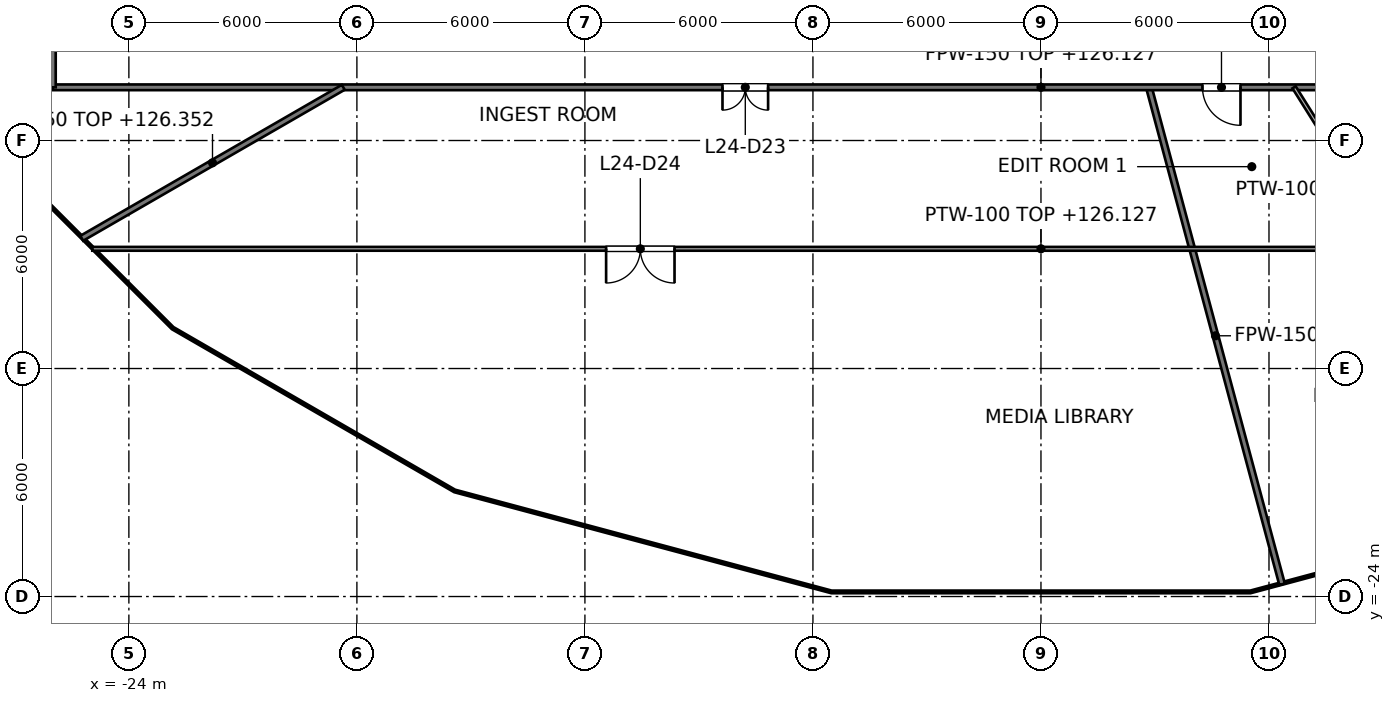
"""IFC4 building model, lengths in metres.
Left out: names, types, materials, properties, quantities, classifications, styles, units other than length and angle.
Written with IfcOpenShell. Run it as: python <this file> out.ifc"""

import sys

from ifc_helpers import new_model, si_unit, direction, frame, frame_2d, origin, place, context, subcontext, project, spatial, rectangle, extrude, element, fill, save


model = new_model("IFC4")
c1 = context("Model", 3, precision=1e-05, world=origin(), true_north=direction((0.0, 1.0)))
c2 = subcontext(c1, "Body", "Model", "MODEL_VIEW")
j1 = project(units=[si_unit("LENGTHUNIT", "METRE"), si_unit("PLANEANGLEUNIT", "RADIAN")], contexts=[c1])
p1 = place(None, origin())
s1 = spatial("IfcSite", under=j1, at=p1, CompositionType="ELEMENT")
p2 = place(p1, origin())
s2 = spatial("IfcBuilding", under=s1, at=p2, CompositionType="ELEMENT")
p3 = place(p2, frame((0.0, 0.0, 123.0)))
s3 = spatial("IfcBuildingStorey", under=s2, at=p3, CompositionType="ELEMENT", Elevation=123.0)
p4 = place(p3, frame((2.84, -10.6, 0.0), z_axis=(0.0, 0.0, 1.0), x_axis=(0.258833134742, -0.965922050872, 0.0)))
e1 = element("IfcWall", 1, at=p4, inside=s3, PredefinedType="PARTITIONING", context=c2, shape_type="SweptSolid", body=[
    extrude(rectangle(XDim=13.538, YDim=0.15, at=frame_2d((6.769, 0.0))), origin(), (0.0, 0.0, 1.0), 3.502),
])
p5 = place(p3, frame((-26.0, -10.6, 0.0), z_axis=(0.0, 0.0, 1.0), x_axis=(1.0, 0.0, 0.0)))
e2 = element("IfcWall", 2, at=p5, inside=s3, PredefinedType="PARTITIONING", context=c2, shape_type="SweptSolid", body=[
    extrude(rectangle(XDim=52.0, YDim=0.15, at=frame_2d((26.0, 0.0))), origin(), (0.0, 0.0, 1.0), 3.127),
])
p6 = place(p5, frame((17.62, 0.0, 0.0)))
e3 = element("IfcOpeningElement", 3, at=p6, cuts=e2, PredefinedType="OPENING", context=c2, shape_type="SweptSolid", body=[
    extrude(rectangle(XDim=1.2, YDim=2.1, at=frame_2d((0.6, 1.05))), frame((0.0, 0.075, 0.0), z_axis=(0.0, -1.0, 0.0), x_axis=(1.0, 0.0, 0.0)), (0.0, 0.0, 1.0), 0.15),
])
p7 = place(p5, frame((30.25, 0.0, 0.0)))
e4 = element("IfcOpeningElement", 4, at=p7, cuts=e2, PredefinedType="OPENING", context=c2, shape_type="SweptSolid", body=[
    extrude(rectangle(XDim=1.0, YDim=2.1, at=frame_2d((0.5, 1.05))), frame((0.0, 0.075, 0.0), z_axis=(0.0, -1.0, 0.0), x_axis=(1.0, 0.0, 0.0)), (0.0, 0.0, 1.0), 0.15),
])
p8 = place(p5, frame((34.989, 0.0, 0.0)))
e5 = element("IfcOpeningElement", 5, at=p8, cuts=e2, PredefinedType="OPENING", context=c2, shape_type="SweptSolid", body=[
    extrude(rectangle(XDim=1.0, YDim=2.1, at=frame_2d((0.5, 1.05))), frame((0.0, 0.075, 0.0), z_axis=(0.0, -1.0, 0.0), x_axis=(1.0, 0.0, 0.0)), (0.0, 0.0, 1.0), 0.15),
])
p9 = place(p5, frame((44.658, 0.0, 0.0)))
e6 = element("IfcOpeningElement", 6, at=p9, cuts=e2, PredefinedType="OPENING", context=c2, shape_type="SweptSolid", body=[
    extrude(rectangle(XDim=1.0, YDim=2.1, at=frame_2d((0.5, 1.05))), frame((0.0, 0.075, 0.0), z_axis=(0.0, -1.0, 0.0), x_axis=(1.0, 0.0, 0.0)), (0.0, 0.0, 1.0), 0.15),
])
p10 = place(p3, frame((-25.24, -14.573, 0.0), z_axis=(0.0, 0.0, 1.0), x_axis=(0.866020312459, 0.500008818331, 0.0)))
e7 = element("IfcWall", 7, at=p10, inside=s3, PredefinedType="PARTITIONING", context=c2, shape_type="SweptSolid", body=[
    extrude(rectangle(XDim=7.946, YDim=0.15, at=frame_2d((3.973, 0.0))), origin(), (0.0, 0.0, 1.0), 3.352),
])
p11 = place(p3, frame((-26.0, -10.6, 0.0), z_axis=(0.0, 0.0, 1.0), x_axis=(0.0, 1.0, 0.0)))
e8 = element("IfcWall", 8, at=p11, inside=s3, PredefinedType="PARTITIONING", context=c2, shape_type="SweptSolid", body=[
    extrude(rectangle(XDim=2.8, YDim=0.15, at=frame_2d((1.4, 0.0))), origin(), (0.0, 0.0, 1.0), 3.276),
])
p12 = place(p3, frame((6.66, -10.6, 0.0), z_axis=(0.0, 0.0, 1.0), x_axis=(0.532130705972, -0.846662218221, 0.0)))
e9 = element("IfcWall", 9, at=p12, inside=s3, PredefinedType="PARTITIONING", context=c2, shape_type="SweptSolid", body=[
    extrude(rectangle(XDim=5.02, YDim=0.1, at=frame_2d((2.51, 0.0))), origin(), (0.0, 0.0, 1.0), 4.05),
])
p13 = place(p3, frame((-24.963, -14.85, 0.0), z_axis=(0.0, 0.0, 1.0), x_axis=(1.0, 0.0, 0.0)))
e10 = element("IfcWall", 10, at=p13, inside=s3, PredefinedType="PARTITIONING", context=c2, shape_type="SweptSolid", body=[
    extrude(rectangle(XDim=49.926, YDim=0.1, at=frame_2d((24.963, 0.0))), origin(), (0.0, 0.0, 1.0), 3.127),
])
p14 = place(p13, frame((13.521, 0.0, 0.0)))
e11 = element("IfcOpeningElement", 11, at=p14, cuts=e10, PredefinedType="OPENING", context=c2, shape_type="SweptSolid", body=[
    extrude(rectangle(XDim=1.8, YDim=2.1, at=frame_2d((0.9, 1.05))), frame((0.0, 0.05, 0.0), z_axis=(0.0, -1.0, 0.0), x_axis=(1.0, 0.0, 0.0)), (0.0, 0.0, 1.0), 0.1),
])
p15 = place(p13, frame((43.92, 0.0, 0.0)))
e12 = element("IfcOpeningElement", 12, at=p15, cuts=e10, PredefinedType="OPENING", context=c2, shape_type="SweptSolid", body=[
    extrude(rectangle(XDim=0.9, YDim=2.1, at=frame_2d((0.45, 1.05))), frame((0.0, 0.05, 0.0), z_axis=(0.0, -1.0, 0.0), x_axis=(1.0, 0.0, 0.0)), (0.0, 0.0, 1.0), 0.1),
])
p16 = place(p6, origin())
e13 = element("IfcDoor", 13, at=p16, inside=s3, OperationType="DOUBLE_DOOR_SINGLE_SWING", PredefinedType="DOOR", context=c2, shape_type="SweptSolid", body=[
    extrude(rectangle(XDim=1.2, YDim=2.1, at=frame_2d((0.6, 1.05))), frame((0.0, 0.025, 0.0), z_axis=(0.0, -1.0, 0.0), x_axis=(1.0, 0.0, 0.0)), (0.0, 0.0, 1.0), 0.05),
])
fill(e3, e13)
p17 = place(p14, origin())
e14 = element("IfcDoor", 14, at=p17, inside=s3, OperationType="DOUBLE_DOOR_SINGLE_SWING", PredefinedType="DOOR", context=c2, shape_type="SweptSolid", body=[
    extrude(rectangle(XDim=1.8, YDim=2.1, at=frame_2d((0.9, 1.05))), frame((0.0, 0.025, 0.0), z_axis=(0.0, -1.0, 0.0), x_axis=(1.0, 0.0, 0.0)), (0.0, 0.0, 1.0), 0.05),
])
fill(e11, e14)
p18 = place(p7, origin())
e15 = element("IfcDoor", 15, at=p18, inside=s3, OperationType="SINGLE_SWING_RIGHT", PredefinedType="DOOR", context=c2, shape_type="SweptSolid", body=[
    extrude(rectangle(XDim=1.0, YDim=2.1, at=frame_2d((0.5, 1.05))), frame((0.0, 0.025, 0.0), z_axis=(0.0, -1.0, 0.0), x_axis=(1.0, 0.0, 0.0)), (0.0, 0.0, 1.0), 0.05),
])
fill(e4, e15)
save(model, sys.argv[1])
